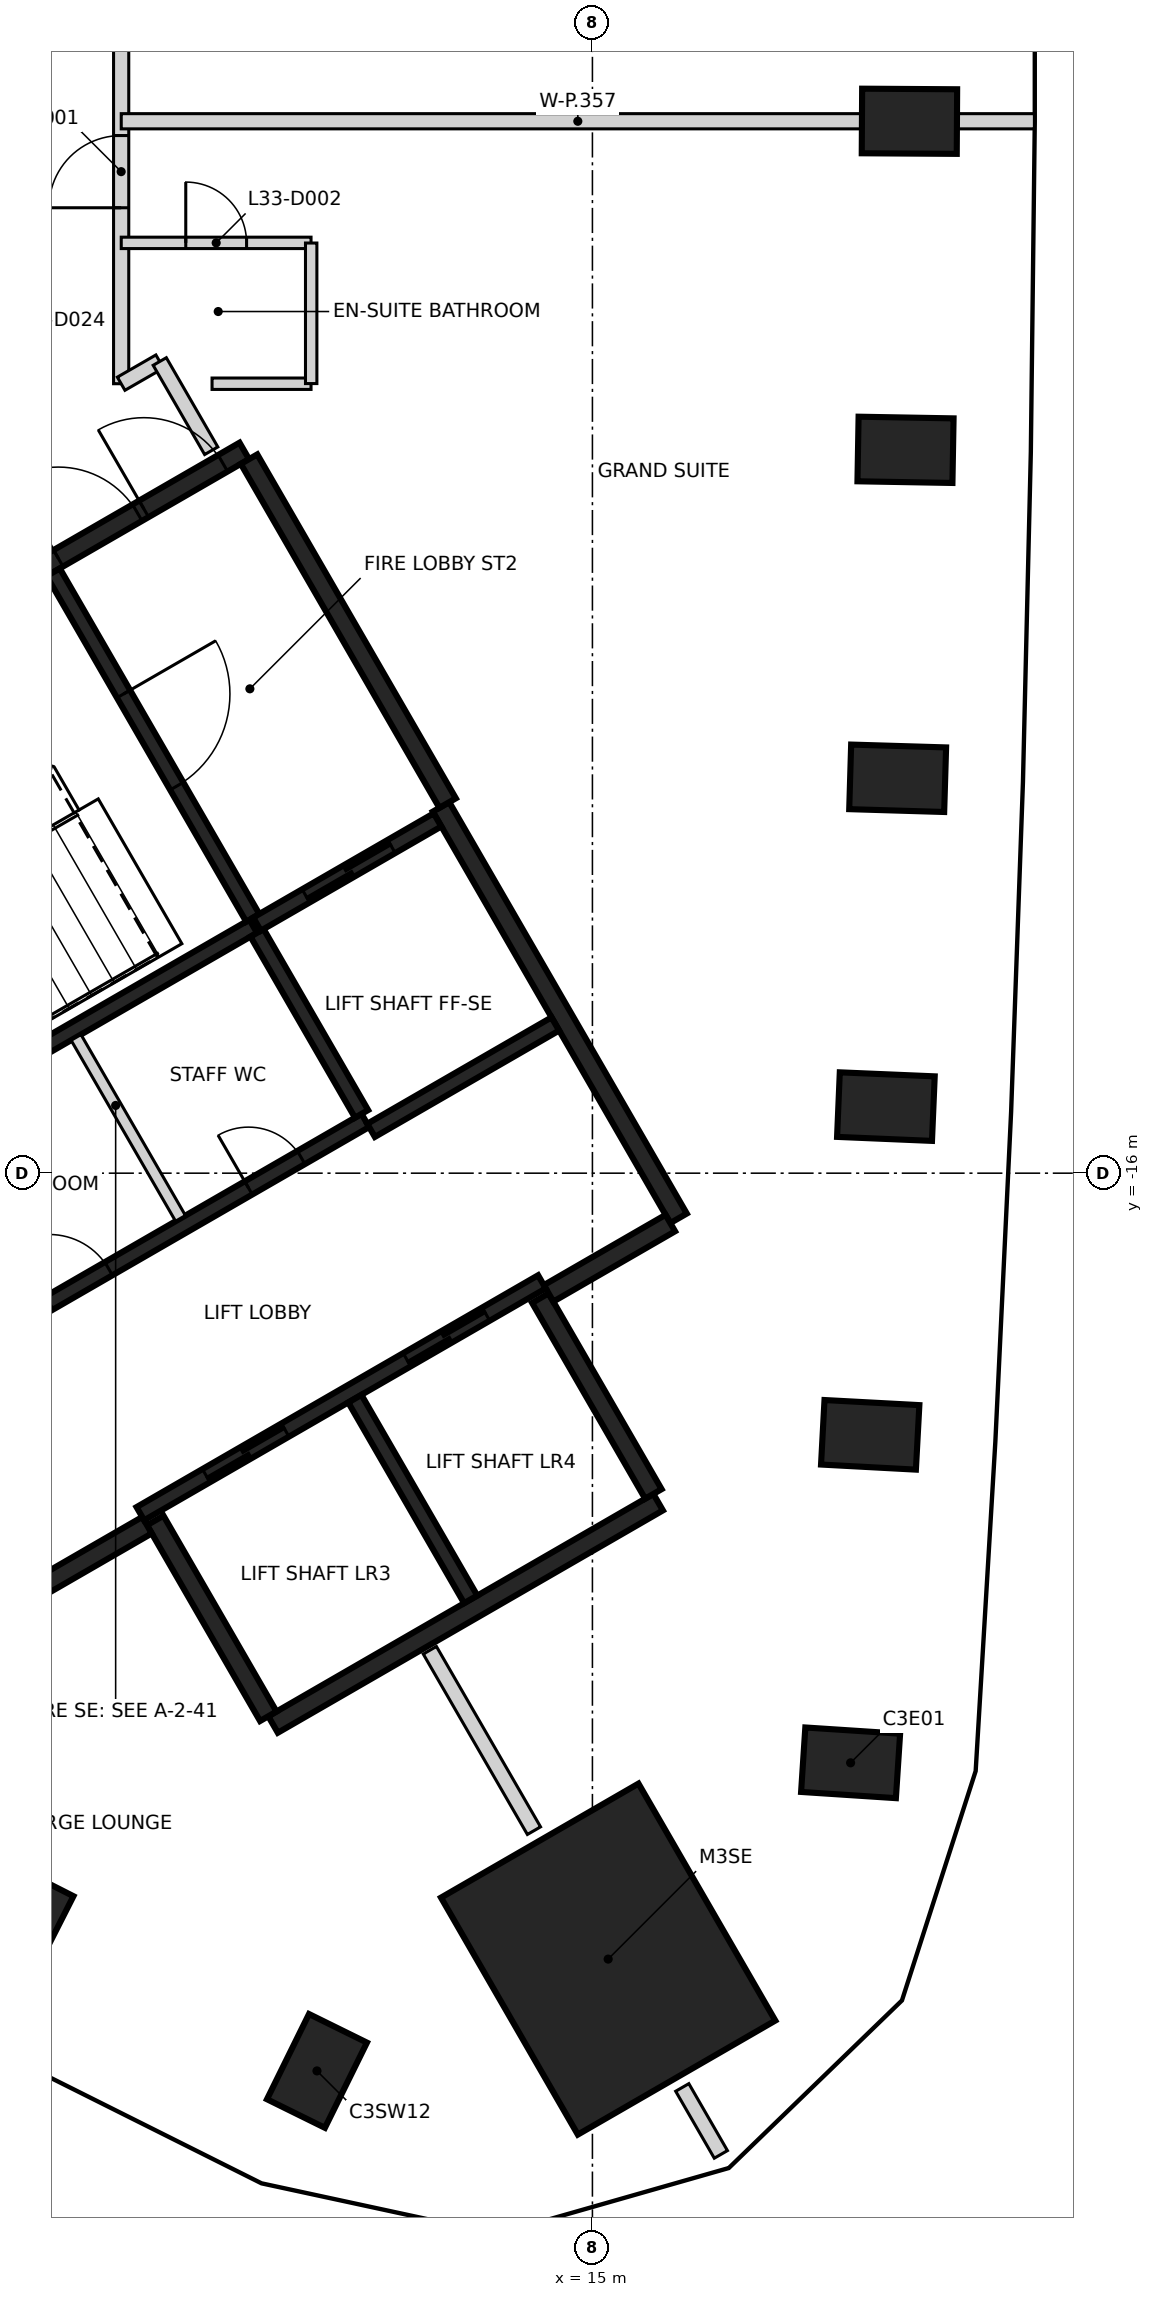
"""IFC4 building model, lengths in metres.
Left out: names, types, materials, properties, quantities, classifications, styles, units other than length and angle.
Written with IfcOpenShell. Run it as: python <this file> out.ifc"""

import sys

from ifc_helpers import new_model, si_unit, direction, frame, frame_2d, origin, origin_2d, place, context, subcontext, project, spatial, rectangle, extrude, element, fill, save


model = new_model("IFC4")
c1 = context("Model", 3, precision=1e-05, world=origin(), true_north=direction((0.0, 1.0)))
c2 = subcontext(c1, "Body", "Model", "MODEL_VIEW")
j1 = project(units=[si_unit("LENGTHUNIT", "METRE"), si_unit("PLANEANGLEUNIT", "RADIAN")], contexts=[c1])
p1 = place(None, origin())
s1 = spatial("IfcSite", under=j1, at=p1, CompositionType="ELEMENT")
p2 = place(p1, origin())
s2 = spatial("IfcBuilding", under=s1, at=p2, CompositionType="ELEMENT")
p3 = place(p2, frame((0.0, 0.0, 136.0)))
s3 = spatial("IfcBuildingStorey", under=s2, at=p3, CompositionType="ELEMENT", Elevation=136.0)
for number, where, z_axis, x_axis in (
    (1, (18.397, -23.757, -0.4), (0.0, 0.0, 1.0), (-0.998, 0.065, 0.0)),
    (2, (18.655, -19.442, -0.4), (0.0, 0.0, 1.0), (-0.999, 0.054, 0.0)),
    (3, (18.861, -15.124, -0.4), (0.0, 0.0, 1.0), (-0.999, 0.042, 0.0)),
    (4, (19.016, -10.805, -0.4), (0.0, 0.0, 1.0), (-1.0, 0.03, 0.0)),
    (5, (19.119, -6.484, -0.4), (0.0, 0.0, 1.0), (-1.0, 0.018, 0.0)),
    (6, (19.171, -2.161, -0.4), (0.0, 0.0, 1.0), (-1.0, 0.006, 0.0)),
    (7, (7.51, -25.876, -0.4), (0.0, 0.0, 1.0), (0.453, 0.892, 0.0)),
    (8, (11.376, -27.811, -0.4), (0.0, 0.0, 1.0), (0.442, 0.897, 0.0)),
):
    element("IfcColumn", number, at=place(p3, frame(where, z_axis=z_axis, x_axis=x_axis)), inside=s3, PredefinedType="COLUMN", context=c2, shape_type="SweptSolid", body=[
        extrude(rectangle(XDim=1.25, YDim=0.85, at=origin_2d()), origin(), (0.0, 0.0, 1.0), 3.6),
    ])
p4 = place(p3, frame((15.207, -26.34, -0.4), z_axis=(0.0, 0.0, 1.0), x_axis=(-0.5, 0.866025403784, 0.0)))
e9 = element("IfcColumn", 9, at=p4, inside=s3, PredefinedType="COLUMN", context=c2, shape_type="SweptSolid", body=[
    extrude(rectangle(XDim=3.6, YDim=3.0, at=origin_2d()), origin(), (0.0, 0.0, 1.0), 3.6),
])
p5 = place(p3, frame((0.417, -12.273, 0.0), z_axis=(0.0, 0.0, 1.0), x_axis=(0.866021906294, 0.500006057782, 0.0)))
e10 = element("IfcWall", 10, at=p5, inside=s3, PredefinedType="SHEAR", context=c2, shape_type="SweptSolid", body=[
    extrude(rectangle(XDim=11.55, YDim=0.25, at=frame_2d((5.775, 0.0))), origin(), (0.0, 0.0, 1.0), 3.2),
])
p6 = place(p5, frame((10.025, 0.0, 0.0)))
e11 = element("IfcOpeningElement", 11, at=p6, cuts=e10, PredefinedType="OPENING", context=c2, shape_type="SweptSolid", body=[
    extrude(rectangle(XDim=1.2, YDim=2.1, at=frame_2d((0.6, 1.05))), frame((0.0, 0.135, 0.0), z_axis=(0.0, -1.0, 0.0), x_axis=(1.0, 0.0, 0.0)), (0.0, 0.0, 1.0), 0.27),
])
p7 = place(p5, frame((8.725, 0.0, 0.0)))
e12 = element("IfcOpeningElement", 12, at=p7, cuts=e10, PredefinedType="OPENING", context=c2, shape_type="SweptSolid", body=[
    extrude(rectangle(XDim=1.2, YDim=2.1, at=frame_2d((0.6, 1.05))), frame((0.0, 0.135, 0.0), z_axis=(0.0, -1.0, 0.0), x_axis=(1.0, 0.0, 0.0)), (0.0, 0.0, 1.0), 0.27),
])
p8 = place(p3, frame((13.008, -11.181, 0.0), z_axis=(0.0, 0.0, 1.0), x_axis=(0.500004234368, -0.866022959057, 0.0)))
e13 = element("IfcWall", 13, at=p8, inside=s3, PredefinedType="SHEAR", context=c2, shape_type="SweptSolid", body=[
    extrude(rectangle(XDim=6.25, YDim=0.25, at=frame_2d((3.125, 0.0))), origin(), (0.0, 0.0, 1.0), 3.2),
])
p9 = place(p3, frame((15.865, -20.328, 0.0), z_axis=(0.0, 0.0, 1.0), x_axis=(-0.86602852612, -0.499994591916, 0.0)))
e14 = element("IfcWall", 14, at=p9, inside=s3, PredefinedType="SHEAR", context=c2, shape_type="SweptSolid", body=[
    extrude(rectangle(XDim=5.85, YDim=0.25, at=frame_2d((2.925, 0.0))), origin(), (0.0, 0.0, 1.0), 3.2),
])
p10 = place(p3, frame((10.483, -6.606, 0.0), z_axis=(0.0, 0.0, 1.0), x_axis=(0.49999885962, -0.866026062182, 0.0)))
e15 = element("IfcWall", 15, at=p10, inside=s3, PredefinedType="SHEAR", context=c2, shape_type="SweptSolid", body=[
    extrude(rectangle(XDim=5.225, YDim=0.25, at=frame_2d((2.612, 0.0))), origin(), (0.0, 0.0, 1.0), 3.2),
])
for number, where, z_axis, x_axis in (
    (16, (14.315, -17.644, 0.0), (0.0, 0.0, 1.0), (0.5, -0.866, 0.0)),
    (17, (10.736, -23.145, 0.0), (0.0, 0.0, 1.0), (-0.5, 0.866, 0.0)),
):
    element("IfcWall", number, at=place(p3, frame(where, z_axis=z_axis, x_axis=x_axis)), inside=s3, PredefinedType="SHEAR", context=c2, shape_type="SweptSolid", body=[
        extrude(rectangle(XDim=2.974, YDim=0.25, at=frame_2d((1.487, 0.0))), origin(), (0.0, 0.0, 1.0), 3.2),
    ])
p11 = place(p3, frame((9.14, -20.631, 0.0), z_axis=(0.0, 0.0, 1.0), x_axis=(-0.866043531843, -0.499968599967, 0.0)))
e18 = element("IfcWall", 18, at=p11, inside=s3, PredefinedType="SHEAR", context=c2, shape_type="SweptSolid", body=[
    extrude(rectangle(XDim=1.975, YDim=0.25, at=frame_2d((0.987, 0.0))), origin(), (0.0, 0.0, 1.0), 3.2),
])
p12 = place(p3, frame((16.025, -16.656, 0.0), z_axis=(0.0, 0.0, 1.0), x_axis=(-0.866016279763, -0.500015802937, 0.0)))
e19 = element("IfcWall", 19, at=p12, inside=s3, PredefinedType="SHEAR", context=c2, shape_type="SweptSolid", body=[
    extrude(rectangle(XDim=1.849, YDim=0.25, at=frame_2d((0.925, 0.0))), origin(), (0.0, 0.0, 1.0), 3.2),
])
p13 = place(p3, frame((9.052, -20.48, 0.0), z_axis=(0.0, 0.0, 1.0), x_axis=(0.866030299012, 0.499991521122, 0.0)))
e20 = element("IfcWall", 20, at=p13, inside=s3, PredefinedType="SHEAR", context=c2, shape_type="SweptSolid", body=[
    extrude(rectangle(XDim=6.1, YDim=0.2, at=frame_2d((3.05, 0.0))), origin(), (0.0, 0.0, 1.0), 3.2),
])
p14 = place(p13, frame((1.0, 0.0, 0.0)))
e21 = element("IfcOpeningElement", 21, at=p14, cuts=e20, PredefinedType="OPENING", context=c2, shape_type="SweptSolid", body=[
    extrude(rectangle(XDim=1.2, YDim=2.1, at=frame_2d((0.6, 1.05))), frame((0.0, 0.11, 0.0), z_axis=(0.0, -1.0, 0.0), x_axis=(1.0, 0.0, 0.0)), (0.0, 0.0, 1.0), 0.22),
])
p15 = place(p13, frame((4.05, 0.0, 0.0)))
e22 = element("IfcOpeningElement", 22, at=p15, cuts=e20, PredefinedType="OPENING", context=c2, shape_type="SweptSolid", body=[
    extrude(rectangle(XDim=1.2, YDim=2.1, at=frame_2d((0.6, 1.05))), frame((0.0, 0.11, 0.0), z_axis=(0.0, -1.0, 0.0), x_axis=(1.0, 0.0, 0.0)), (0.0, 0.0, 1.0), 0.22),
])
p16 = place(p3, frame((10.538, -12.752, 0.0), z_axis=(0.0, 0.0, 1.0), x_axis=(-0.866038630372, -0.499977090179, 0.0)))
e23 = element("IfcWall", 23, at=p16, inside=s3, PredefinedType="SHEAR", context=c2, shape_type="SweptSolid", body=[
    extrude(rectangle(XDim=5.699, YDim=0.2, at=frame_2d((2.85, 0.0))), origin(), (0.0, 0.0, 1.0), 3.2),
])
p17 = place(p3, frame((7.077, -18.156, 0.0), z_axis=(0.0, 0.0, 1.0), x_axis=(0.866038630372, 0.499977090179, 0.0)))
e24 = element("IfcWall", 24, at=p17, inside=s3, PredefinedType="SHEAR", context=c2, shape_type="SweptSolid", body=[
    extrude(rectangle(XDim=5.699, YDim=0.2, at=frame_2d((2.85, 0.0))), origin(), (0.0, 0.0, 1.0), 3.2),
])
p18 = place(p17, frame((0.899, 0.0, 0.0)))
e25 = element("IfcOpeningElement", 25, at=p18, cuts=e24, PredefinedType="OPENING", context=c2, shape_type="SweptSolid", body=[
    extrude(rectangle(XDim=0.9, YDim=2.1, at=frame_2d((0.45, 1.05))), frame((0.0, 0.11, 0.0), z_axis=(0.0, -1.0, 0.0), x_axis=(1.0, 0.0, 0.0)), (0.0, 0.0, 1.0), 0.22),
])
p19 = place(p17, frame((3.924, 0.0, 0.0)))
e26 = element("IfcOpeningElement", 26, at=p19, cuts=e24, PredefinedType="OPENING", context=c2, shape_type="SweptSolid", body=[
    extrude(rectangle(XDim=0.8, YDim=2.1, at=frame_2d((0.4, 1.05))), frame((0.0, 0.11, 0.0), z_axis=(0.0, -1.0, 0.0), x_axis=(1.0, 0.0, 0.0)), (0.0, 0.0, 1.0), 0.22),
])
p20 = place(p3, frame((7.906, -8.094, 0.0), z_axis=(0.0, 0.0, 1.0), x_axis=(0.500024287448, -0.866011380966, 0.0)))
e27 = element("IfcWall", 27, at=p20, inside=s3, PredefinedType="SHEAR", context=c2, shape_type="SweptSolid", body=[
    extrude(rectangle(XDim=5.251, YDim=0.2, at=frame_2d((2.625, 0.0))), origin(), (0.0, 0.0, 1.0), 3.2),
])
p21 = place(p20, frame((1.849, 0.0, 0.0)))
e28 = element("IfcOpeningElement", 28, at=p21, cuts=e27, PredefinedType="OPENING", context=c2, shape_type="SweptSolid", body=[
    extrude(rectangle(XDim=1.4, YDim=2.1, at=frame_2d((0.7, 1.05))), frame((0.0, 0.11, 0.0), z_axis=(0.0, -1.0, 0.0), x_axis=(1.0, 0.0, 0.0)), (0.0, 0.0, 1.0), 0.22),
])
p22 = place(p3, frame((11.875, -18.967, 0.0), z_axis=(0.0, 0.0, 1.0), x_axis=(0.49998131003, -0.866036194175, 0.0)))
e29 = element("IfcWall", 29, at=p22, inside=s3, PredefinedType="SHEAR", context=c2, shape_type="SweptSolid", body=[
    extrude(rectangle(XDim=3.048, YDim=0.2, at=frame_2d((1.524, 0.0))), origin(), (0.0, 0.0, 1.0), 3.2),
])
p23 = place(p3, frame((11.963, -15.22, 0.0), z_axis=(0.0, 0.0, 1.0), x_axis=(-0.500034990121, 0.866005201286, 0.0)))
e30 = element("IfcWall", 30, at=p23, inside=s3, PredefinedType="SHEAR", context=c2, shape_type="SweptSolid", body=[
    extrude(rectangle(XDim=2.75, YDim=0.2, at=frame_2d((1.375, 0.0))), origin(), (0.0, 0.0, 1.0), 3.2),
])
p24 = place(p3, frame((10.587, -12.723, 0.0), z_axis=(0.0, 0.0, 1.0), x_axis=(0.866037306777, 0.499979382845, 0.0)))
e31 = element("IfcWall", 31, at=p24, inside=s3, PredefinedType="SHEAR", context=c2, shape_type="SweptSolid", body=[
    extrude(rectangle(XDim=2.742, YDim=0.2, at=frame_2d((1.371, 0.0))), origin(), (0.0, 0.0, 1.0), 3.2),
])
p25 = place(p24, frame((0.743, 0.0, 0.0)))
e32 = element("IfcOpeningElement", 32, at=p25, cuts=e31, PredefinedType="OPENING", context=c2, shape_type="SweptSolid", body=[
    extrude(rectangle(XDim=1.3, YDim=2.1, at=frame_2d((0.65, 1.05))), frame((0.0, 0.11, 0.0), z_axis=(0.0, -1.0, 0.0), x_axis=(1.0, 0.0, 0.0)), (0.0, 0.0, 1.0), 0.22),
])
p26 = place(p3, frame((14.512, -14.037, 0.0), z_axis=(0.0, 0.0, 1.0), x_axis=(-0.866044696403, -0.499966582715, 0.0)))
e33 = element("IfcWall", 33, at=p26, inside=s3, PredefinedType="SHEAR", context=c2, shape_type="SweptSolid", body=[
    extrude(rectangle(XDim=2.799, YDim=0.2, at=frame_2d((1.399, 0.0))), origin(), (0.0, 0.0, 1.0), 3.2),
])
p27 = place(p3, frame((8.207, -14.214, 0.0), z_axis=(0.0, 0.0, 1.0), x_axis=(0.50002746344, -0.86600954718, 0.0)))
e34 = element("IfcWall", 34, at=p27, inside=s3, PredefinedType="PARTITIONING", context=c2, shape_type="SweptSolid", body=[
    extrude(rectangle(XDim=2.748, YDim=0.15, at=frame_2d((1.374, 0.0))), origin(), (0.0, 0.0, 1.0), 3.2),
])
p28 = place(p3, frame((8.8, -5.614, 0.0), z_axis=(0.0, 0.0, 1.0), x_axis=(0.0, 1.0, 0.0)))
e35 = element("IfcWall", 35, at=p28, inside=s3, PredefinedType="PARTITIONING", context=c2, shape_type="SweptSolid", body=[
    extrude(rectangle(XDim=9.692, YDim=0.2, at=frame_2d((4.846, 0.0))), origin(), (0.0, 0.0, 1.0), 3.2),
])
p29 = place(p28, frame((2.315, 0.0, 0.0)))
e36 = element("IfcOpeningElement", 36, at=p29, cuts=e35, PredefinedType="OPENING", context=c2, shape_type="SweptSolid", body=[
    extrude(rectangle(XDim=0.95, YDim=2.1, at=frame_2d((0.475, 1.05))), frame((0.0, 0.11, 0.0), z_axis=(0.0, -1.0, 0.0), x_axis=(1.0, 0.0, 0.0)), (0.0, 0.0, 1.0), 0.22),
])
p30 = place(p28, frame((5.114, 0.0, 0.0)))
e37 = element("IfcOpeningElement", 37, at=p30, cuts=e35, PredefinedType="OPENING", context=c2, shape_type="SweptSolid", body=[
    extrude(rectangle(XDim=1.0, YDim=2.1, at=frame_2d((0.5, 1.05))), frame((0.0, 0.11, 0.0), z_axis=(0.0, -1.0, 0.0), x_axis=(1.0, 0.0, 0.0)), (0.0, 0.0, 1.0), 0.22),
])
p31 = place(p3, frame((8.8, -5.614, 0.0), z_axis=(0.0, 0.0, 1.0), x_axis=(0.866491166515, 0.499192406143, 0.0)))
e38 = element("IfcWall", 38, at=p31, inside=s3, PredefinedType="PARTITIONING", context=c2, shape_type="SweptSolid", body=[
    extrude(rectangle(XDim=0.585, YDim=0.2, at=frame_2d((0.292, 0.0))), origin(), (0.0, 0.0, 1.0), 3.2),
])
p32 = place(p3, frame((9.308, -5.322, 0.0), z_axis=(0.0, 0.0, 1.0), x_axis=(0.499644515495, -0.866230545603, 0.0)))
e39 = element("IfcWall", 39, at=p32, inside=s3, PredefinedType="PARTITIONING", context=c2, shape_type="SweptSolid", body=[
    extrude(rectangle(XDim=1.356, YDim=0.2, at=frame_2d((0.678, 0.0))), origin(), (0.0, 0.0, 1.0), 3.2),
])
p33 = place(p3, frame((8.801, -2.161, 0.0), z_axis=(0.0, 0.0, 1.0), x_axis=(1.0, 0.0, 0.0)))
e40 = element("IfcWall", 40, at=p33, inside=s3, PredefinedType="PARTITIONING", context=c2, shape_type="SweptSolid", body=[
    extrude(rectangle(XDim=12.014, YDim=0.2, at=frame_2d((6.007, 0.0))), origin(), (0.0, 0.0, 1.0), 3.2),
])
p34 = place(p3, frame((12.861, -22.276, 0.0), z_axis=(0.0, 0.0, 1.0), x_axis=(0.49982784299, -0.866124775868, 0.0)))
e41 = element("IfcWall", 41, at=p34, inside=s3, PredefinedType="PARTITIONING", context=c2, shape_type="SweptSolid", body=[
    extrude(rectangle(XDim=2.741, YDim=0.2, at=frame_2d((1.37, 0.0))), origin(), (0.0, 0.0, 1.0), 3.2),
])
p35 = place(p3, frame((16.182, -28.028, 0.0), z_axis=(0.0, 0.0, 1.0), x_axis=(0.499625455419, -0.866241539236, 0.0)))
e42 = element("IfcWall", 42, at=p35, inside=s3, PredefinedType="PARTITIONING", context=c2, shape_type="SweptSolid", body=[
    extrude(rectangle(XDim=1.017, YDim=0.2, at=frame_2d((0.508, 0.0))), origin(), (0.0, 0.0, 1.0), 3.2),
])
p36 = place(p3, frame((8.801, -3.761, 0.0), z_axis=(0.0, 0.0, 1.0), x_axis=(1.0, 0.0, 0.0)))
e43 = element("IfcWall", 43, at=p36, inside=s3, PredefinedType="PARTITIONING", context=c2, shape_type="SweptSolid", body=[
    extrude(rectangle(XDim=2.497, YDim=0.15, at=frame_2d((1.249, 0.0))), origin(), (0.0, 0.0, 1.0), 3.2),
])
p37 = place(p36, frame((0.849, 0.0, 0.0)))
e44 = element("IfcOpeningElement", 44, at=p37, cuts=e43, PredefinedType="OPENING", context=c2, shape_type="SweptSolid", body=[
    extrude(rectangle(XDim=0.8, YDim=2.1, at=frame_2d((0.4, 1.05))), frame((0.0, 0.085, 0.0), z_axis=(0.0, -1.0, 0.0), x_axis=(1.0, 0.0, 0.0)), (0.0, 0.0, 1.0), 0.17),
])
p38 = place(p3, frame((11.298, -5.614, 0.0), z_axis=(0.0, 0.0, 1.0), x_axis=(-1.0, 0.0, 0.0)))
e45 = element("IfcWall", 45, at=p38, inside=s3, PredefinedType="PARTITIONING", context=c2, shape_type="SweptSolid", body=[
    extrude(rectangle(XDim=1.302, YDim=0.15, at=frame_2d((0.651, 0.0))), origin(), (0.0, 0.0, 1.0), 3.2),
])
p39 = place(p3, frame((11.3, -5.612, 0.0), z_axis=(0.0, 0.0, 1.0), x_axis=(0.0, 1.0, 0.0)))
e46 = element("IfcWall", 46, at=p39, inside=s3, PredefinedType="PARTITIONING", context=c2, shape_type="SweptSolid", body=[
    extrude(rectangle(XDim=1.849, YDim=0.15, at=frame_2d((0.925, 0.0))), origin(), (0.0, 0.0, 1.0), 3.2),
])
p40 = place(p25, origin())
e47 = element("IfcDoor", 47, at=p40, inside=s3, OperationType="SLIDING_TO_RIGHT", PredefinedType="DOOR", context=c2, shape_type="SweptSolid", body=[
    extrude(rectangle(XDim=1.3, YDim=2.1, at=frame_2d((0.65, 1.05))), frame((0.0, 0.025, 0.0), z_axis=(0.0, -1.0, 0.0), x_axis=(1.0, 0.0, 0.0)), (0.0, 0.0, 1.0), 0.05),
])
fill(e32, e47)
p41 = place(p14, origin())
e48 = element("IfcDoor", 48, at=p41, inside=s3, OperationType="DOUBLE_DOOR_SLIDING", PredefinedType="DOOR", context=c2, shape_type="SweptSolid", body=[
    extrude(rectangle(XDim=1.2, YDim=2.1, at=frame_2d((0.6, 1.05))), frame((0.0, 0.025, 0.0), z_axis=(0.0, -1.0, 0.0), x_axis=(1.0, 0.0, 0.0)), (0.0, 0.0, 1.0), 0.05),
])
fill(e21, e48)
p42 = place(p15, origin())
e49 = element("IfcDoor", 49, at=p42, inside=s3, OperationType="DOUBLE_DOOR_SLIDING", PredefinedType="DOOR", context=c2, shape_type="SweptSolid", body=[
    extrude(rectangle(XDim=1.2, YDim=2.1, at=frame_2d((0.6, 1.05))), frame((0.0, 0.025, 0.0), z_axis=(0.0, -1.0, 0.0), x_axis=(1.0, 0.0, 0.0)), (0.0, 0.0, 1.0), 0.05),
])
fill(e22, e49)
p43 = place(p6, origin())
e50 = element("IfcDoor", 50, at=p43, inside=s3, OperationType="SINGLE_SWING_LEFT", PredefinedType="DOOR", context=c2, shape_type="SweptSolid", body=[
    extrude(rectangle(XDim=1.2, YDim=2.1, at=frame_2d((0.6, 1.05))), frame((0.0, 0.025, 0.0), z_axis=(0.0, -1.0, 0.0), x_axis=(1.0, 0.0, 0.0)), (0.0, 0.0, 1.0), 0.05),
])
fill(e11, e50)
p44 = place(p7, origin())
e51 = element("IfcDoor", 51, at=p44, inside=s3, OperationType="SINGLE_SWING_RIGHT", PredefinedType="DOOR", context=c2, shape_type="SweptSolid", body=[
    extrude(rectangle(XDim=1.2, YDim=2.1, at=frame_2d((0.6, 1.05))), frame((0.0, 0.025, 0.0), z_axis=(0.0, -1.0, 0.0), x_axis=(1.0, 0.0, 0.0)), (0.0, 0.0, 1.0), 0.05),
])
fill(e12, e51)
p45 = place(p21, origin())
e52 = element("IfcDoor", 52, at=p45, inside=s3, OperationType="SINGLE_SWING_RIGHT", PredefinedType="DOOR", context=c2, shape_type="SweptSolid", body=[
    extrude(rectangle(XDim=1.4, YDim=2.1, at=frame_2d((0.7, 1.05))), frame((0.0, 0.025, 0.0), z_axis=(0.0, -1.0, 0.0), x_axis=(1.0, 0.0, 0.0)), (0.0, 0.0, 1.0), 0.05),
])
fill(e28, e52)
p46 = place(p18, origin())
e53 = element("IfcDoor", 53, at=p46, inside=s3, OperationType="SINGLE_SWING_LEFT", PredefinedType="DOOR", context=c2, shape_type="SweptSolid", body=[
    extrude(rectangle(XDim=0.9, YDim=2.1, at=frame_2d((0.45, 1.05))), frame((0.0, 0.025, 0.0), z_axis=(0.0, -1.0, 0.0), x_axis=(1.0, 0.0, 0.0)), (0.0, 0.0, 1.0), 0.05),
])
fill(e25, e53)
p47 = place(p19, origin())
e54 = element("IfcDoor", 54, at=p47, inside=s3, OperationType="SINGLE_SWING_RIGHT", PredefinedType="DOOR", context=c2, shape_type="SweptSolid", body=[
    extrude(rectangle(XDim=0.8, YDim=2.1, at=frame_2d((0.4, 1.05))), frame((0.0, 0.025, 0.0), z_axis=(0.0, -1.0, 0.0), x_axis=(1.0, 0.0, 0.0)), (0.0, 0.0, 1.0), 0.05),
])
fill(e26, e54)
p48 = place(p29, frame((0.95, 0.0, 0.0), z_axis=(0.0, 0.0, 1.0), x_axis=(-1.0, 0.0, 0.0)))
e55 = element("IfcDoor", 55, at=p48, inside=s3, OperationType="SINGLE_SWING_LEFT", PredefinedType="DOOR", context=c2, shape_type="SweptSolid", body=[
    extrude(rectangle(XDim=0.95, YDim=2.1, at=frame_2d((0.475, 1.05))), frame((0.0, 0.025, 0.0), z_axis=(0.0, -1.0, 0.0), x_axis=(1.0, 0.0, 0.0)), (0.0, 0.0, 1.0), 0.05),
])
fill(e36, e55)
p49 = place(p37, frame((0.8, 0.0, 0.0), z_axis=(0.0, 0.0, 1.0), x_axis=(-1.0, 0.0, 0.0)))
e56 = element("IfcDoor", 56, at=p49, inside=s3, OperationType="SINGLE_SWING_LEFT", PredefinedType="DOOR", context=c2, shape_type="SweptSolid", body=[
    extrude(rectangle(XDim=0.8, YDim=2.1, at=frame_2d((0.4, 1.05))), frame((0.0, 0.025, 0.0), z_axis=(0.0, -1.0, 0.0), x_axis=(1.0, 0.0, 0.0)), (0.0, 0.0, 1.0), 0.05),
])
fill(e44, e56)
save(model, sys.argv[1])
